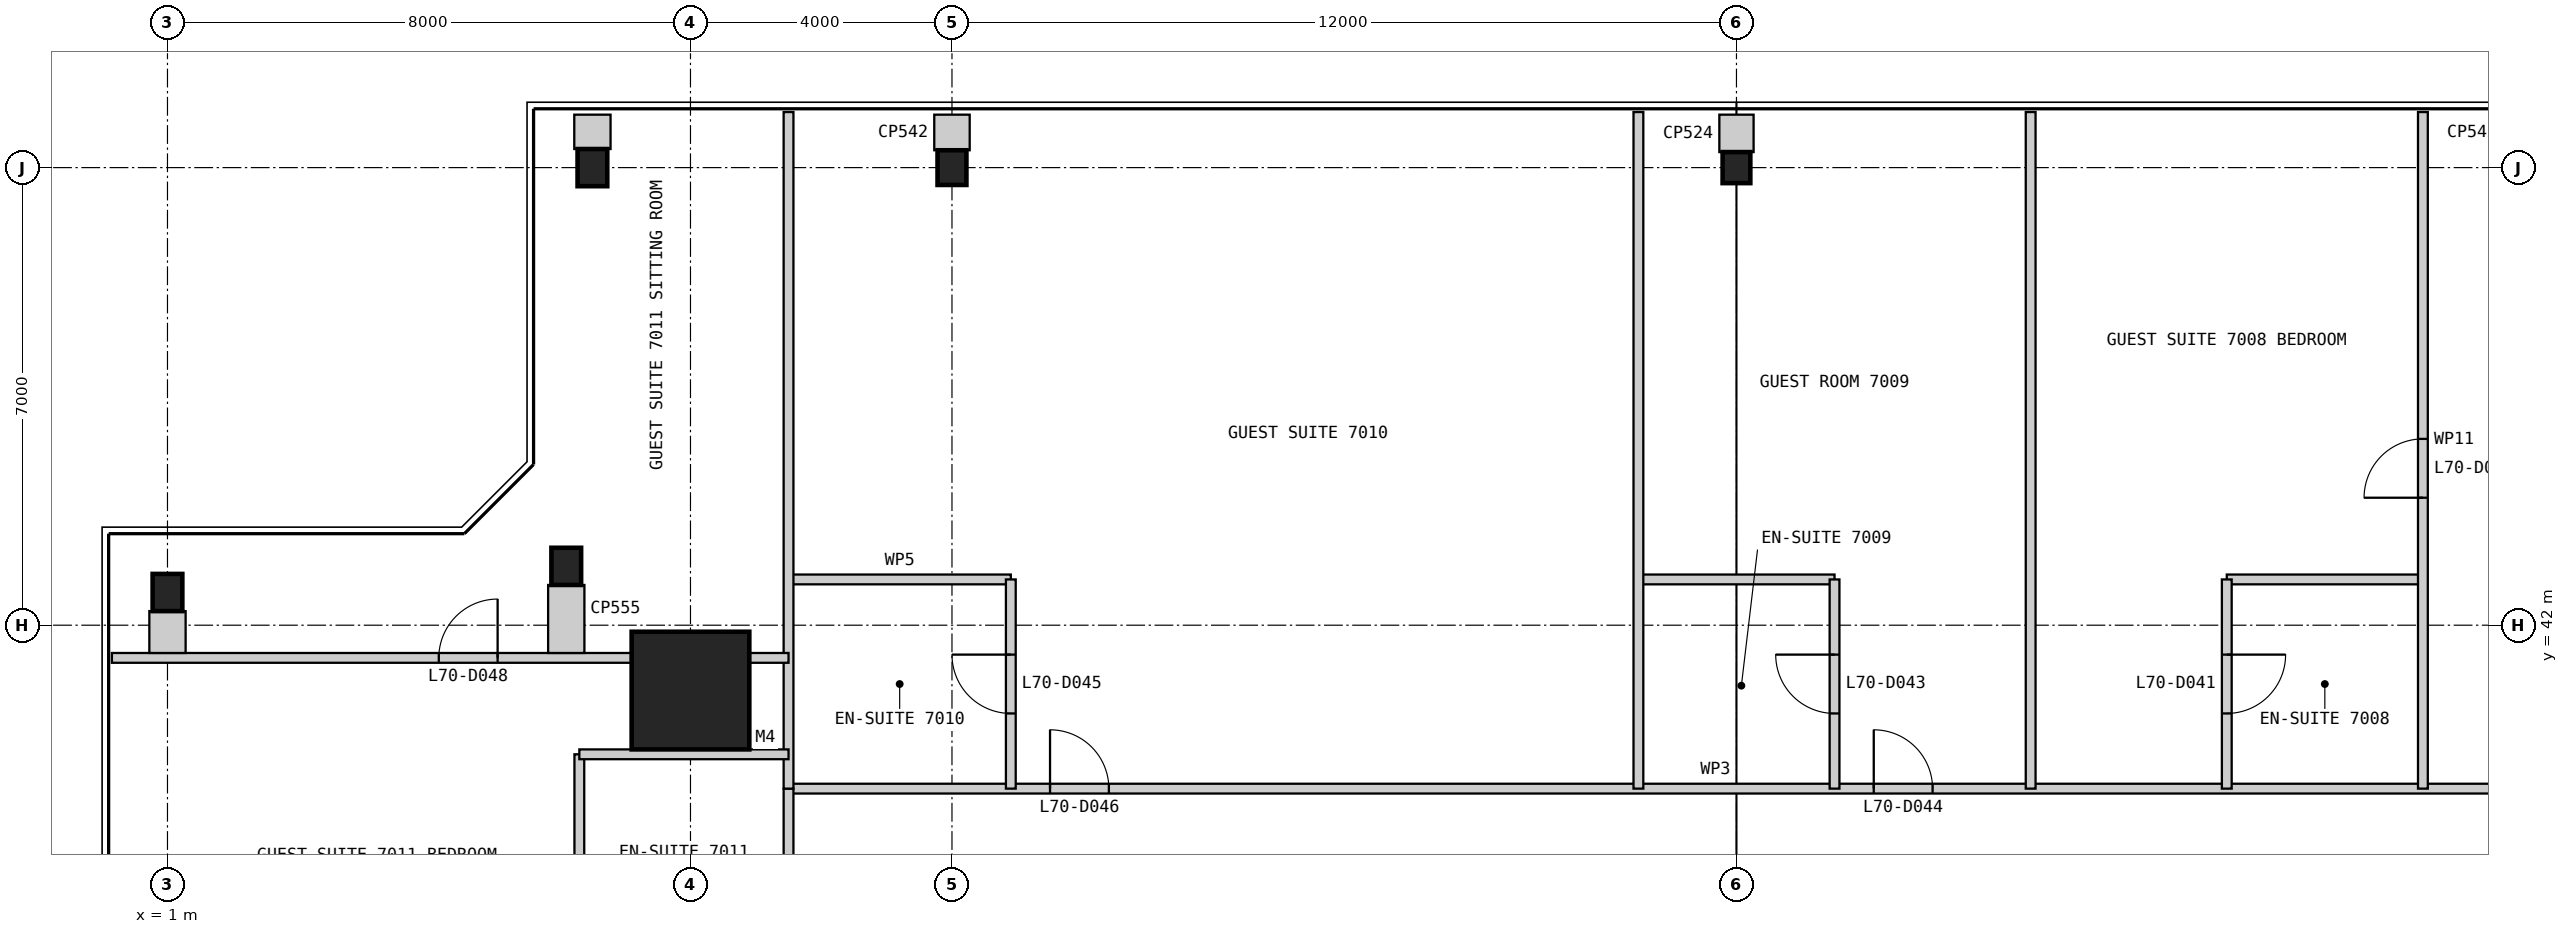
"""IFC4 building model, lengths in metres.
Left out: names, types, materials, properties, quantities, classifications, styles, units other than length and angle.
Written with IfcOpenShell. Run it as: python <this file> out.ifc"""

import sys

from ifc_helpers import new_model, si_unit, direction, frame, frame_2d, origin, origin_2d, place, context, subcontext, project, spatial, rectangle, i_section, extrude, element, fill, save


model = new_model("IFC4")
c1 = context("Model", 3, precision=1e-05, world=origin(), true_north=direction((0.0, 1.0)))
c2 = subcontext(c1, "Body", "Model", "MODEL_VIEW")
j1 = project(units=[si_unit("LENGTHUNIT", "METRE"), si_unit("PLANEANGLEUNIT", "RADIAN")], contexts=[c1])
p1 = place(None, origin())
s1 = spatial("IfcSite", under=j1, at=p1, CompositionType="ELEMENT")
p2 = place(p1, origin())
s2 = spatial("IfcBuilding", under=s1, at=p2, CompositionType="ELEMENT")
p3 = place(p2, frame((0.0, 0.0, 290.0)))
s3 = spatial("IfcBuildingStorey", under=s2, at=p3, CompositionType="ELEMENT", Elevation=290.0)
p4 = place(p3, frame((9.0, 41.0, 0.0), z_axis=(0.0, 0.0, 1.0), x_axis=(1.0, 0.0, 0.0)))
e1 = element("IfcColumn", 1, at=p4, inside=s3, PredefinedType="COLUMN", context=c2, shape_type="SweptSolid", body=[
    extrude(rectangle(XDim=1.8, YDim=1.8, at=origin_2d()), origin(), (0.0, 0.0, 1.0), 3.4),
])
p5 = place(p3, frame((25.0, 49.0, 0.0), z_axis=(0.0, 0.0, 1.0), x_axis=(1.0, 0.0, 0.0)))
e2 = element("IfcColumn", 2, at=p5, inside=s3, PredefinedType="COLUMN", context=c2, shape_type="SweptSolid", body=[
    extrude(i_section(OverallWidth=0.424, OverallDepth=0.475, WebThickness=0.048, FlangeThickness=0.077, at=origin_2d()), origin(), (0.0, 0.0, 1.0), 3.4),
])
p6 = place(p3, frame((13.0, 49.0, 0.0), z_axis=(0.0, 0.0, 1.0), x_axis=(1.0, 0.0, 0.0)))
e3 = element("IfcColumn", 3, at=p6, inside=s3, PredefinedType="COLUMN", context=c2, shape_type="SweptSolid", body=[
    extrude(i_section(OverallWidth=0.442, OverallDepth=0.531, WebThickness=0.066, FlangeThickness=0.106, at=origin_2d()), origin(), (0.0, 0.0, 1.0), 3.4),
])
for number, where, z_axis, x_axis in (
    (4, (7.5, 49.0, 0.0), (0.0, 0.0, 1.0), (1.0, 0.0, 0.0)),
    (5, (7.1, 42.9, 0.0), (0.0, 0.0, 1.0), (1.0, 0.0, 0.0)),
    (6, (1.0, 42.5, 0.0), (0.0, 0.0, 1.0), (1.0, 0.0, 0.0)),
):
    element("IfcColumn", number, at=place(p3, frame(where, z_axis=z_axis, x_axis=x_axis)), inside=s3, PredefinedType="COLUMN", context=c2, shape_type="SweptSolid", body=[
        extrude(i_section(OverallWidth=0.455, OverallDepth=0.569, WebThickness=0.078, FlangeThickness=0.125, at=origin_2d()), origin(), (0.0, 0.0, 1.0), 3.4),
    ])
p7 = place(p3, frame((39.5, 39.5, 0.0), z_axis=(0.0, 0.0, 1.0), x_axis=(-1.0, 0.0, 0.0)))
e7 = element("IfcWall", 7, at=p7, inside=s3, PredefinedType="PARTITIONING", context=c2, shape_type="SweptSolid", body=[
    extrude(rectangle(XDim=29.0, YDim=0.15, at=frame_2d((14.5, 0.0))), origin(), (0.0, 0.0, 1.0), 3.25),
])
p8 = place(p7, frame((1.85, 0.0, 0.0)))
e8 = element("IfcOpeningElement", 8, at=p8, cuts=e7, PredefinedType="OPENING", context=c2, shape_type="SweptSolid", body=[
    extrude(rectangle(XDim=0.9, YDim=2.1, at=frame_2d((0.45, 1.05))), frame((0.0, 0.085, 0.0), z_axis=(0.0, -1.0, 0.0), x_axis=(1.0, 0.0, 0.0)), (0.0, 0.0, 1.0), 0.17),
])
p9 = place(p7, frame((11.5, 0.0, 0.0)))
e9 = element("IfcOpeningElement", 9, at=p9, cuts=e7, PredefinedType="OPENING", context=c2, shape_type="SweptSolid", body=[
    extrude(rectangle(XDim=0.9, YDim=2.1, at=frame_2d((0.45, 1.05))), frame((0.0, 0.085, 0.0), z_axis=(0.0, -1.0, 0.0), x_axis=(1.0, 0.0, 0.0)), (0.0, 0.0, 1.0), 0.17),
])
p10 = place(p7, frame((24.1, 0.0, 0.0)))
e10 = element("IfcOpeningElement", 10, at=p10, cuts=e7, PredefinedType="OPENING", context=c2, shape_type="SweptSolid", body=[
    extrude(rectangle(XDim=0.9, YDim=2.1, at=frame_2d((0.45, 1.05))), frame((0.0, 0.085, 0.0), z_axis=(0.0, -1.0, 0.0), x_axis=(1.0, 0.0, 0.0)), (0.0, 0.0, 1.0), 0.17),
])
p11 = place(p3, frame((35.5, 42.7, 0.0), z_axis=(0.0, 0.0, 1.0), x_axis=(-1.0, 0.0, 0.0)))
e11 = element("IfcWall", 11, at=p11, inside=s3, PredefinedType="PARTITIONING", context=c2, shape_type="SweptSolid", body=[
    extrude(rectangle(XDim=3.0, YDim=0.15, at=frame_2d((1.5, 0.0))), origin(), (0.0, 0.0, 1.0), 3.25),
])
p12 = place(p3, frame((32.5, 42.7, 0.0), z_axis=(0.0, 0.0, 1.0), x_axis=(0.0, -1.0, 0.0)))
e12 = element("IfcWall", 12, at=p12, inside=s3, PredefinedType="PARTITIONING", context=c2, shape_type="SweptSolid", body=[
    extrude(rectangle(XDim=3.2, YDim=0.15, at=frame_2d((1.6, 0.0))), origin(), (0.0, 0.0, 1.0), 3.25),
])
p13 = place(p12, frame((1.15, 0.0, 0.0)))
e13 = element("IfcOpeningElement", 13, at=p13, cuts=e12, PredefinedType="OPENING", context=c2, shape_type="SweptSolid", body=[
    extrude(rectangle(XDim=0.9, YDim=2.1, at=frame_2d((0.45, 1.05))), frame((0.0, 0.085, 0.0), z_axis=(0.0, -1.0, 0.0), x_axis=(1.0, 0.0, 0.0)), (0.0, 0.0, 1.0), 0.17),
])
p14 = place(p3, frame((35.5, 49.85, 0.0), z_axis=(0.0, 0.0, 1.0), x_axis=(0.0, -1.0, 0.0)))
e14 = element("IfcWall", 14, at=p14, inside=s3, PredefinedType="PARTITIONING", context=c2, shape_type="SweptSolid", body=[
    extrude(rectangle(XDim=10.35, YDim=0.15, at=frame_2d((5.175, 0.0))), origin(), (0.0, 0.0, 1.0), 3.25),
])
p15 = place(p14, frame((5.0, 0.0, 0.0)))
e15 = element("IfcOpeningElement", 15, at=p15, cuts=e14, PredefinedType="OPENING", context=c2, shape_type="SweptSolid", body=[
    extrude(rectangle(XDim=0.9, YDim=2.1, at=frame_2d((0.45, 1.05))), frame((0.0, 0.085, 0.0), z_axis=(0.0, -1.0, 0.0), x_axis=(1.0, 0.0, 0.0)), (0.0, 0.0, 1.0), 0.17),
])
p16 = place(p3, frame((29.5, 49.85, 0.0), z_axis=(0.0, 0.0, 1.0), x_axis=(0.0, -1.0, 0.0)))
e16 = element("IfcWall", 16, at=p16, inside=s3, PredefinedType="PARTITIONING", context=c2, shape_type="SweptSolid", body=[
    extrude(rectangle(XDim=10.35, YDim=0.15, at=frame_2d((5.175, 0.0))), origin(), (0.0, 0.0, 1.0), 3.25),
])
p17 = place(p3, frame((26.5, 42.7, 0.0), z_axis=(0.0, 0.0, 1.0), x_axis=(-1.0, 0.0, 0.0)))
e17 = element("IfcWall", 17, at=p17, inside=s3, PredefinedType="PARTITIONING", context=c2, shape_type="SweptSolid", body=[
    extrude(rectangle(XDim=3.0, YDim=0.15, at=frame_2d((1.5, 0.0))), origin(), (0.0, 0.0, 1.0), 3.25),
])
p18 = place(p3, frame((26.5, 42.7, 0.0), z_axis=(0.0, 0.0, 1.0), x_axis=(0.0, -1.0, 0.0)))
e18 = element("IfcWall", 18, at=p18, inside=s3, PredefinedType="PARTITIONING", context=c2, shape_type="SweptSolid", body=[
    extrude(rectangle(XDim=3.2, YDim=0.15, at=frame_2d((1.6, 0.0))), origin(), (0.0, 0.0, 1.0), 3.25),
])
p19 = place(p18, frame((1.15, 0.0, 0.0)))
e19 = element("IfcOpeningElement", 19, at=p19, cuts=e18, PredefinedType="OPENING", context=c2, shape_type="SweptSolid", body=[
    extrude(rectangle(XDim=0.9, YDim=2.1, at=frame_2d((0.45, 1.05))), frame((0.0, 0.085, 0.0), z_axis=(0.0, -1.0, 0.0), x_axis=(1.0, 0.0, 0.0)), (0.0, 0.0, 1.0), 0.17),
])
p20 = place(p3, frame((23.5, 49.85, 0.0), z_axis=(0.0, 0.0, 1.0), x_axis=(0.0, -1.0, 0.0)))
e20 = element("IfcWall", 20, at=p20, inside=s3, PredefinedType="PARTITIONING", context=c2, shape_type="SweptSolid", body=[
    extrude(rectangle(XDim=10.35, YDim=0.15, at=frame_2d((5.175, 0.0))), origin(), (0.0, 0.0, 1.0), 3.25),
])
p21 = place(p3, frame((13.9, 42.7, 0.0), z_axis=(0.0, 0.0, 1.0), x_axis=(-1.0, 0.0, 0.0)))
e21 = element("IfcWall", 21, at=p21, inside=s3, PredefinedType="PARTITIONING", context=c2, shape_type="SweptSolid", body=[
    extrude(rectangle(XDim=3.4, YDim=0.15, at=frame_2d((1.7, 0.0))), origin(), (0.0, 0.0, 1.0), 3.25),
])
p22 = place(p3, frame((13.9, 42.7, 0.0), z_axis=(0.0, 0.0, 1.0), x_axis=(0.0, -1.0, 0.0)))
e22 = element("IfcWall", 22, at=p22, inside=s3, PredefinedType="PARTITIONING", context=c2, shape_type="SweptSolid", body=[
    extrude(rectangle(XDim=3.2, YDim=0.15, at=frame_2d((1.6, 0.0))), origin(), (0.0, 0.0, 1.0), 3.25),
])
p23 = place(p22, frame((1.15, 0.0, 0.0)))
e23 = element("IfcOpeningElement", 23, at=p23, cuts=e22, PredefinedType="OPENING", context=c2, shape_type="SweptSolid", body=[
    extrude(rectangle(XDim=0.9, YDim=2.1, at=frame_2d((0.45, 1.05))), frame((0.0, 0.085, 0.0), z_axis=(0.0, -1.0, 0.0), x_axis=(1.0, 0.0, 0.0)), (0.0, 0.0, 1.0), 0.17),
])
p24 = place(p3, frame((10.5, 39.5, 0.0), z_axis=(0.0, 0.0, 1.0), x_axis=(0.0, -1.0, 0.0)))
e24 = element("IfcWall", 24, at=p24, inside=s3, PredefinedType="PARTITIONING", context=c2, shape_type="SweptSolid", body=[
    extrude(rectangle(XDim=29.0, YDim=0.15, at=frame_2d((14.5, 0.0))), origin(), (0.0, 0.0, 1.0), 3.25),
])
p25 = place(p24, frame((2.775, 0.0, 0.0)))
e25 = element("IfcOpeningElement", 25, at=p25, cuts=e24, PredefinedType="OPENING", context=c2, shape_type="SweptSolid", body=[
    extrude(rectangle(XDim=0.9, YDim=2.1, at=frame_2d((0.45, 1.05))), frame((0.0, 0.085, 0.0), z_axis=(0.0, -1.0, 0.0), x_axis=(1.0, 0.0, 0.0)), (0.0, 0.0, 1.0), 0.17),
])
p26 = place(p24, frame((11.1, 0.0, 0.0)))
e26 = element("IfcOpeningElement", 26, at=p26, cuts=e24, PredefinedType="OPENING", context=c2, shape_type="SweptSolid", body=[
    extrude(rectangle(XDim=0.9, YDim=2.1, at=frame_2d((0.45, 1.05))), frame((0.0, 0.085, 0.0), z_axis=(0.0, -1.0, 0.0), x_axis=(1.0, 0.0, 0.0)), (0.0, 0.0, 1.0), 0.17),
])
p27 = place(p24, frame((17.5, 0.0, 0.0)))
e27 = element("IfcOpeningElement", 27, at=p27, cuts=e24, PredefinedType="OPENING", context=c2, shape_type="SweptSolid", body=[
    extrude(rectangle(XDim=0.9, YDim=2.1, at=frame_2d((0.45, 1.05))), frame((0.0, 0.085, 0.0), z_axis=(0.0, -1.0, 0.0), x_axis=(1.0, 0.0, 0.0)), (0.0, 0.0, 1.0), 0.17),
])
p28 = place(p24, frame((24.5, 0.0, 0.0)))
e28 = element("IfcOpeningElement", 28, at=p28, cuts=e24, PredefinedType="OPENING", context=c2, shape_type="SweptSolid", body=[
    extrude(rectangle(XDim=0.9, YDim=2.1, at=frame_2d((0.45, 1.05))), frame((0.0, 0.085, 0.0), z_axis=(0.0, -1.0, 0.0), x_axis=(1.0, 0.0, 0.0)), (0.0, 0.0, 1.0), 0.17),
])
p29 = place(p3, frame((10.5, 49.85, 0.0), z_axis=(0.0, 0.0, 1.0), x_axis=(0.0, -1.0, 0.0)))
e29 = element("IfcWall", 29, at=p29, inside=s3, PredefinedType="PARTITIONING", context=c2, shape_type="SweptSolid", body=[
    extrude(rectangle(XDim=10.35, YDim=0.15, at=frame_2d((5.175, 0.0))), origin(), (0.0, 0.0, 1.0), 3.25),
])
p30 = place(p3, frame((7.3, 40.025, 0.0), z_axis=(0.0, 0.0, 1.0), x_axis=(0.0, -1.0, 0.0)))
e30 = element("IfcWall", 30, at=p30, inside=s3, PredefinedType="PARTITIONING", context=c2, shape_type="SweptSolid", body=[
    extrude(rectangle(XDim=3.0, YDim=0.15, at=frame_2d((1.5, 0.0))), origin(), (0.0, 0.0, 1.0), 3.25),
])
p31 = place(p3, frame((7.3, 40.025, 0.0), z_axis=(0.0, 0.0, 1.0), x_axis=(1.0, 0.0, 0.0)))
e31 = element("IfcWall", 31, at=p31, inside=s3, PredefinedType="PARTITIONING", context=c2, shape_type="SweptSolid", body=[
    extrude(rectangle(XDim=3.2, YDim=0.15, at=frame_2d((1.6, 0.0))), origin(), (0.0, 0.0, 1.0), 3.25),
])
p32 = place(p3, frame((0.15, 41.5, 0.0), z_axis=(0.0, 0.0, 1.0), x_axis=(1.0, 0.0, 0.0)))
e32 = element("IfcWall", 32, at=p32, inside=s3, PredefinedType="PARTITIONING", context=c2, shape_type="SweptSolid", body=[
    extrude(rectangle(XDim=10.35, YDim=0.15, at=frame_2d((5.175, 0.0))), origin(), (0.0, 0.0, 1.0), 3.25),
])
p33 = place(p32, frame((5.0, 0.0, 0.0)))
e33 = element("IfcOpeningElement", 33, at=p33, cuts=e32, PredefinedType="OPENING", context=c2, shape_type="SweptSolid", body=[
    extrude(rectangle(XDim=0.9, YDim=2.1, at=frame_2d((0.45, 1.05))), frame((0.0, 0.085, 0.0), z_axis=(0.0, -1.0, 0.0), x_axis=(1.0, 0.0, 0.0)), (0.0, 0.0, 1.0), 0.17),
])
p34 = place(p3, frame((25.0, 49.81, 0.0), z_axis=(0.0, 0.0, 1.0), x_axis=(0.0, -1.0, 0.0)))
e34 = element("IfcWall", 34, at=p34, inside=s3, PredefinedType="PARTITIONING", context=c2, shape_type="SweptSolid", body=[
    extrude(rectangle(XDim=0.573, YDim=0.524, at=frame_2d((0.286, 0.0))), origin(), (0.0, 0.0, 1.0), 3.25),
])
p35 = place(p3, frame((13.0, 49.81, 0.0), z_axis=(0.0, 0.0, 1.0), x_axis=(0.0, -1.0, 0.0)))
e35 = element("IfcWall", 35, at=p35, inside=s3, PredefinedType="PARTITIONING", context=c2, shape_type="SweptSolid", body=[
    extrude(rectangle(XDim=0.545, YDim=0.542, at=frame_2d((0.272, 0.0))), origin(), (0.0, 0.0, 1.0), 3.25),
])
p36 = place(p3, frame((7.5, 49.81, 0.0), z_axis=(0.0, 0.0, 1.0), x_axis=(0.0, -1.0, 0.0)))
e36 = element("IfcWall", 36, at=p36, inside=s3, PredefinedType="PARTITIONING", context=c2, shape_type="SweptSolid", body=[
    extrude(rectangle(XDim=0.526, YDim=0.555, at=frame_2d((0.263, 0.0))), origin(), (0.0, 0.0, 1.0), 3.25),
])
p37 = place(p3, frame((7.1, 41.575, 0.0), z_axis=(0.0, 0.0, 1.0), x_axis=(0.0, 1.0, 0.0)))
e37 = element("IfcWall", 37, at=p37, inside=s3, PredefinedType="PARTITIONING", context=c2, shape_type="SweptSolid", body=[
    extrude(rectangle(XDim=1.041, YDim=0.555, at=frame_2d((0.52, 0.0))), origin(), (0.0, 0.0, 1.0), 3.25),
])
p38 = place(p3, frame((1.0, 41.575, 0.0), z_axis=(0.0, 0.0, 1.0), x_axis=(0.0, 1.0, 0.0)))
e38 = element("IfcWall", 38, at=p38, inside=s3, PredefinedType="PARTITIONING", context=c2, shape_type="SweptSolid", body=[
    extrude(rectangle(XDim=0.641, YDim=0.555, at=frame_2d((0.32, 0.0))), origin(), (0.0, 0.0, 1.0), 2.338),
])
p39 = place(p13, origin())
e39 = element("IfcDoor", 39, at=p39, inside=s3, OperationType="SINGLE_SWING_LEFT", PredefinedType="DOOR", context=c2, shape_type="SweptSolid", body=[
    extrude(rectangle(XDim=0.9, YDim=2.1, at=frame_2d((0.45, 1.05))), frame((0.0, 0.025, 0.0), z_axis=(0.0, -1.0, 0.0), x_axis=(1.0, 0.0, 0.0)), (0.0, 0.0, 1.0), 0.05),
])
fill(e13, e39)
p40 = place(p15, frame((0.9, 0.0, 0.0), z_axis=(0.0, 0.0, 1.0), x_axis=(-1.0, 0.0, 0.0)))
e40 = element("IfcDoor", 40, at=p40, inside=s3, OperationType="SINGLE_SWING_LEFT", PredefinedType="DOOR", context=c2, shape_type="SweptSolid", body=[
    extrude(rectangle(XDim=0.9, YDim=2.1, at=frame_2d((0.45, 1.05))), frame((0.0, 0.025, 0.0), z_axis=(0.0, -1.0, 0.0), x_axis=(1.0, 0.0, 0.0)), (0.0, 0.0, 1.0), 0.05),
])
fill(e15, e40)
p41 = place(p19, frame((0.9, 0.0, 0.0), z_axis=(0.0, 0.0, 1.0), x_axis=(-1.0, 0.0, 0.0)))
e41 = element("IfcDoor", 41, at=p41, inside=s3, OperationType="SINGLE_SWING_RIGHT", PredefinedType="DOOR", context=c2, shape_type="SweptSolid", body=[
    extrude(rectangle(XDim=0.9, YDim=2.1, at=frame_2d((0.45, 1.05))), frame((0.0, 0.025, 0.0), z_axis=(0.0, -1.0, 0.0), x_axis=(1.0, 0.0, 0.0)), (0.0, 0.0, 1.0), 0.05),
])
fill(e19, e41)
p42 = place(p9, frame((0.9, 0.0, 0.0), z_axis=(0.0, 0.0, 1.0), x_axis=(-1.0, 0.0, 0.0)))
e42 = element("IfcDoor", 42, at=p42, inside=s3, OperationType="SINGLE_SWING_LEFT", PredefinedType="DOOR", context=c2, shape_type="SweptSolid", body=[
    extrude(rectangle(XDim=0.9, YDim=2.1, at=frame_2d((0.45, 1.05))), frame((0.0, 0.025, 0.0), z_axis=(0.0, -1.0, 0.0), x_axis=(1.0, 0.0, 0.0)), (0.0, 0.0, 1.0), 0.05),
])
fill(e9, e42)
p43 = place(p23, frame((0.9, 0.0, 0.0), z_axis=(0.0, 0.0, 1.0), x_axis=(-1.0, 0.0, 0.0)))
e43 = element("IfcDoor", 43, at=p43, inside=s3, OperationType="SINGLE_SWING_RIGHT", PredefinedType="DOOR", context=c2, shape_type="SweptSolid", body=[
    extrude(rectangle(XDim=0.9, YDim=2.1, at=frame_2d((0.45, 1.05))), frame((0.0, 0.025, 0.0), z_axis=(0.0, -1.0, 0.0), x_axis=(1.0, 0.0, 0.0)), (0.0, 0.0, 1.0), 0.05),
])
fill(e23, e43)
p44 = place(p10, frame((0.9, 0.0, 0.0), z_axis=(0.0, 0.0, 1.0), x_axis=(-1.0, 0.0, 0.0)))
e44 = element("IfcDoor", 44, at=p44, inside=s3, OperationType="SINGLE_SWING_LEFT", PredefinedType="DOOR", context=c2, shape_type="SweptSolid", body=[
    extrude(rectangle(XDim=0.9, YDim=2.1, at=frame_2d((0.45, 1.05))), frame((0.0, 0.025, 0.0), z_axis=(0.0, -1.0, 0.0), x_axis=(1.0, 0.0, 0.0)), (0.0, 0.0, 1.0), 0.05),
])
fill(e10, e44)
p45 = place(p33, origin())
e45 = element("IfcDoor", 45, at=p45, inside=s3, OperationType="SINGLE_SWING_RIGHT", PredefinedType="DOOR", context=c2, shape_type="SweptSolid", body=[
    extrude(rectangle(XDim=0.9, YDim=2.1, at=frame_2d((0.45, 1.05))), frame((0.0, 0.025, 0.0), z_axis=(0.0, -1.0, 0.0), x_axis=(1.0, 0.0, 0.0)), (0.0, 0.0, 1.0), 0.05),
])
fill(e33, e45)
save(model, sys.argv[1])
